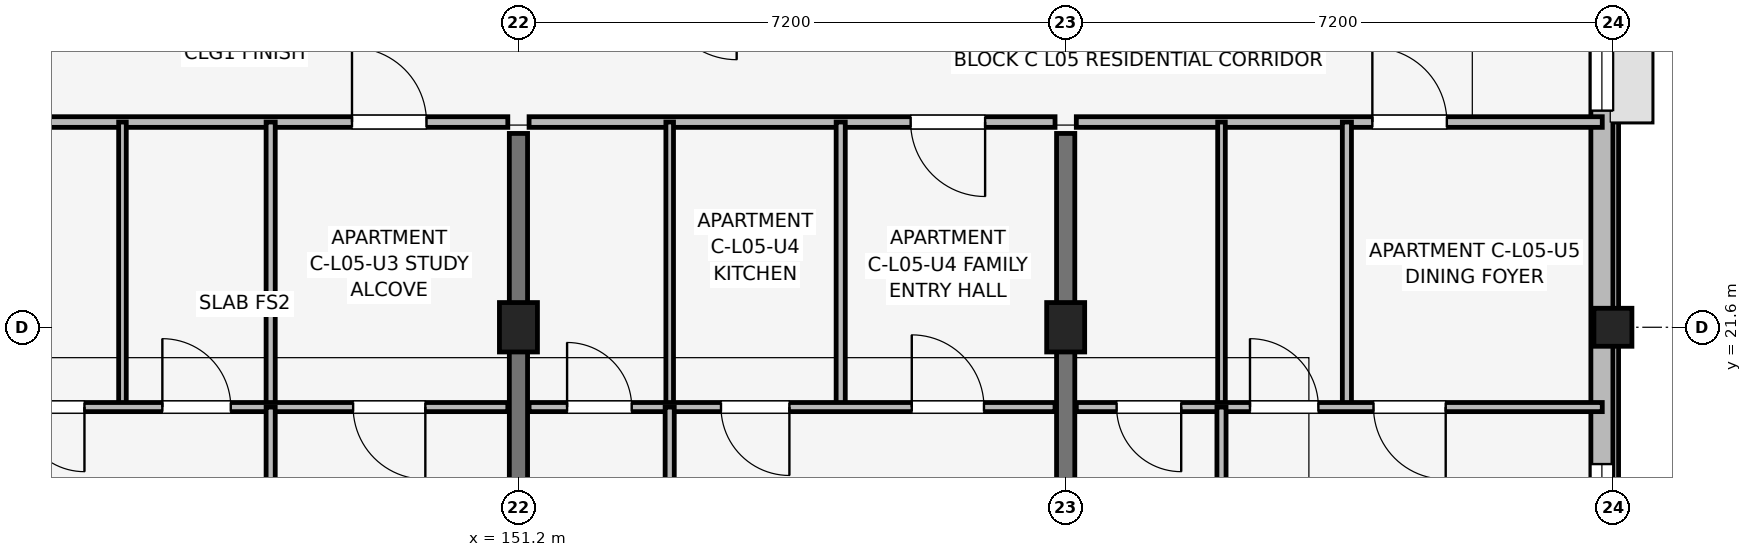
"""IFC4 building model, lengths in metres.
Left out: names, types, materials, properties, quantities, classifications, styles, units other than length and angle.
Written with IfcOpenShell. Run it as: python <this file> out.ifc"""

import sys

from ifc_helpers import new_model, si_unit, direction, frame, frame_2d, origin, origin_2d, place, context, subcontext, project, spatial, rectangle, extrude, element, fill, save


model = new_model("IFC4")
c1 = context("Model", 3, precision=1e-05, world=origin(), true_north=direction((0.0, 1.0)))
c2 = subcontext(c1, "Body", "Model", "MODEL_VIEW")
j1 = project(units=[si_unit("LENGTHUNIT", "METRE"), si_unit("PLANEANGLEUNIT", "RADIAN")], contexts=[c1])
p1 = place(None, origin())
s1 = spatial("IfcSite", under=j1, at=p1, CompositionType="ELEMENT")
p2 = place(p1, origin())
s2 = spatial("IfcBuilding", under=s1, at=p2, CompositionType="ELEMENT")
p3 = place(p2, frame((0.0, 0.0, 18.15)))
s3 = spatial("IfcBuildingStorey", under=s2, at=p3, CompositionType="ELEMENT", Elevation=18.15)
for number, where, z_axis, x_axis in (
    (1, (151.2, 21.6, 0.0), (0.0, 0.0, 1.0), (1.0, 0.0, 0.0)),
    (2, (158.4, 21.6, 0.0), (0.0, 0.0, 1.0), (1.0, 0.0, 0.0)),
):
    element("IfcColumn", number, at=place(p3, frame(where, z_axis=z_axis, x_axis=x_axis)), inside=s3, PredefinedType="COLUMN", context=c2, shape_type="SweptSolid", body=[
        extrude(rectangle(XDim=0.5, YDim=0.65, at=origin_2d()), origin(), (0.0, 0.0, 1.0), 3.15),
    ])
p4 = place(p3, frame((165.6, 21.6, 0.0), z_axis=(0.0, 0.0, 1.0), x_axis=(1.0, 0.0, 0.0)))
e3 = element("IfcColumn", 3, at=p4, inside=s3, PredefinedType="COLUMN", context=c2, shape_type="SweptSolid", body=[
    extrude(rectangle(XDim=0.5, YDim=0.5, at=origin_2d()), origin(), (0.0, 0.0, 1.0), 3.15),
])
for number, where, z_axis, x_axis in (
    (4, (151.2, 14.75, 0.0), (0.0, 0.0, 1.0), (0.0, 1.0, 0.0)),
    (5, (158.4, 14.75, 0.0), (0.0, 0.0, 1.0), (0.0, 1.0, 0.0)),
):
    element("IfcWall", number, at=place(p3, frame(where, z_axis=z_axis, x_axis=x_axis)), inside=s3, PredefinedType="SHEAR", context=c2, shape_type="SweptSolid", body=[
        extrude(rectangle(XDim=9.4, YDim=0.24, at=frame_2d((4.7, 0.0))), origin(), (0.0, 0.0, 1.0), 3.15),
    ])
p5 = place(p3, frame((165.455, 17.4, 0.0), z_axis=(0.0, 0.0, 1.0), x_axis=(0.0, 1.0, 0.0)))
e6 = element("IfcWall", 6, at=p5, inside=s3, PredefinedType="SOLIDWALL", context=c2, shape_type="SweptSolid", body=[
    extrude(rectangle(XDim=15.6, YDim=0.29, at=frame_2d((7.8, 0.0))), origin(), (0.0, 0.0, 1.0), 2.38),
])
p6 = place(p5, frame((7.05, 0.0, 1.05)))
e7 = element("IfcOpeningElement", 7, at=p6, cuts=e6, PredefinedType="OPENING", context=c2, shape_type="SweptSolid", body=[
    extrude(rectangle(XDim=1.5, YDim=1.15, at=frame_2d((0.75, 0.575))), frame((0.0, 0.155, 0.0), z_axis=(0.0, -1.0, 0.0), x_axis=(1.0, 0.0, 0.0)), (0.0, 0.0, 1.0), 0.31),
])
p7 = place(p5, frame((0.98, 0.0, 0.67)))
e8 = element("IfcOpeningElement", 8, at=p7, cuts=e6, PredefinedType="OPENING", context=c2, shape_type="SweptSolid", body=[
    extrude(rectangle(XDim=1.42, YDim=1.6, at=frame_2d((0.71, 0.8))), frame((0.0, 0.155, 0.0), z_axis=(0.0, -1.0, 0.0), x_axis=(1.0, 0.0, 0.0)), (0.0, 0.0, 1.0), 0.31),
])
p8 = place(p3, frame((144.14, 24.3, 0.0), z_axis=(0.0, 0.0, 1.0), x_axis=(1.0, 0.0, 0.0)))
e9 = element("IfcWall", 9, at=p8, inside=s3, PredefinedType="PARTITIONING", context=c2, shape_type="SweptSolid", body=[
    extrude(rectangle(XDim=6.92, YDim=0.14, at=frame_2d((3.46, 0.0))), origin(), (0.0, 0.0, 1.0), 2.38),
])
p9 = place(p8, frame((4.87, 0.0, 0.0)))
e10 = element("IfcOpeningElement", 10, at=p9, cuts=e9, PredefinedType="OPENING", context=c2, shape_type="SweptSolid", body=[
    extrude(rectangle(XDim=0.98, YDim=2.1, at=frame_2d((0.49, 1.05))), frame((0.0, 0.08, 0.0), z_axis=(0.0, -1.0, 0.0), x_axis=(1.0, 0.0, 0.0)), (0.0, 0.0, 1.0), 0.16),
])
p10 = place(p3, frame((145.99, 20.55, 0.0), z_axis=(0.0, 0.0, 1.0), x_axis=(0.0, 1.0, 0.0)))
e11 = element("IfcWall", 11, at=p10, inside=s3, PredefinedType="PARTITIONING", context=c2, shape_type="SweptSolid", body=[
    extrude(rectangle(XDim=3.75, YDim=0.1, at=frame_2d((1.875, 0.0))), origin(), (0.0, 0.0, 1.0), 2.375),
])
p11 = place(p3, frame((147.94, 20.55, 0.0), z_axis=(0.0, 0.0, 1.0), x_axis=(0.0, 1.0, 0.0)))
e12 = element("IfcWall", 12, at=p11, inside=s3, PredefinedType="PARTITIONING", context=c2, shape_type="SweptSolid", body=[
    extrude(rectangle(XDim=3.75, YDim=0.12, at=frame_2d((1.875, 0.0))), origin(), (0.0, 0.0, 1.0), 2.375),
])
p12 = place(p3, frame((144.14, 20.55, 0.0), z_axis=(0.0, 0.0, 1.0), x_axis=(1.0, 0.0, 0.0)))
e13 = element("IfcWall", 13, at=p12, inside=s3, PredefinedType="PARTITIONING", context=c2, shape_type="SweptSolid", body=[
    extrude(rectangle(XDim=6.92, YDim=0.12, at=frame_2d((3.46, 0.0))), origin(), (0.0, 0.0, 1.0), 2.38),
])
p13 = place(p12, frame((1.35, 0.0, 0.0), z_axis=(0.0, 0.0, 1.0), x_axis=(-1.0, 0.0, 0.0)))
e14 = element("IfcOpeningElement", 14, at=p13, cuts=e13, PredefinedType="OPENING", context=c2, shape_type="SweptSolid", body=[
    extrude(rectangle(XDim=0.85, YDim=2.08, at=frame_2d((0.425, 1.04))), frame((0.0, 0.07, 0.0), z_axis=(0.0, -1.0, 0.0), x_axis=(1.0, 0.0, 0.0)), (0.0, 0.0, 1.0), 0.14),
])
p14 = place(p12, frame((2.375, 0.0, 0.0)))
e15 = element("IfcOpeningElement", 15, at=p14, cuts=e13, PredefinedType="OPENING", context=c2, shape_type="SweptSolid", body=[
    extrude(rectangle(XDim=0.9, YDim=2.08, at=frame_2d((0.45, 1.04))), frame((0.0, 0.07, 0.0), z_axis=(0.0, -1.0, 0.0), x_axis=(1.0, 0.0, 0.0)), (0.0, 0.0, 1.0), 0.14),
])
p15 = place(p12, frame((5.835, 0.0, 0.0), z_axis=(0.0, 0.0, 1.0), x_axis=(-1.0, 0.0, 0.0)))
e16 = element("IfcOpeningElement", 16, at=p15, cuts=e13, PredefinedType="OPENING", context=c2, shape_type="SweptSolid", body=[
    extrude(rectangle(XDim=0.95, YDim=2.08, at=frame_2d((0.475, 1.04))), frame((0.0, 0.07, 0.0), z_axis=(0.0, -1.0, 0.0), x_axis=(1.0, 0.0, 0.0)), (0.0, 0.0, 1.0), 0.14),
])
p16 = place(p3, frame((147.94, 14.7, 0.0), z_axis=(0.0, 0.0, 1.0), x_axis=(0.0, 1.0, 0.0)))
e17 = element("IfcWall", 17, at=p16, inside=s3, PredefinedType="PARTITIONING", context=c2, shape_type="SweptSolid", body=[
    extrude(rectangle(XDim=5.85, YDim=0.12, at=frame_2d((2.925, 0.0))), origin(), (0.0, 0.0, 1.0), 2.38),
])
p17 = place(p16, frame((2.475, 0.0, 0.0)))
e18 = element("IfcOpeningElement", 18, at=p17, cuts=e17, PredefinedType="OPENING", context=c2, shape_type="SweptSolid", body=[
    extrude(rectangle(XDim=0.9, YDim=2.08, at=frame_2d((0.45, 1.04))), frame((0.0, 0.07, 0.0), z_axis=(0.0, -1.0, 0.0), x_axis=(1.0, 0.0, 0.0)), (0.0, 0.0, 1.0), 0.14),
])
p18 = place(p3, frame((151.34, 24.3, 0.0), z_axis=(0.0, 0.0, 1.0), x_axis=(1.0, 0.0, 0.0)))
e19 = element("IfcWall", 19, at=p18, inside=s3, PredefinedType="PARTITIONING", context=c2, shape_type="SweptSolid", body=[
    extrude(rectangle(XDim=6.92, YDim=0.14, at=frame_2d((3.46, 0.0))), origin(), (0.0, 0.0, 1.0), 2.38),
])
p19 = place(p18, frame((6.0, 0.0, 0.0), z_axis=(0.0, 0.0, 1.0), x_axis=(-1.0, 0.0, 0.0)))
e20 = element("IfcOpeningElement", 20, at=p19, cuts=e19, PredefinedType="OPENING", context=c2, shape_type="SweptSolid", body=[
    extrude(rectangle(XDim=0.98, YDim=2.1, at=frame_2d((0.49, 1.05))), frame((0.0, 0.08, 0.0), z_axis=(0.0, -1.0, 0.0), x_axis=(1.0, 0.0, 0.0)), (0.0, 0.0, 1.0), 0.16),
])
p20 = place(p3, frame((153.19, 20.55, 0.0), z_axis=(0.0, 0.0, 1.0), x_axis=(0.0, 1.0, 0.0)))
e21 = element("IfcWall", 21, at=p20, inside=s3, PredefinedType="PARTITIONING", context=c2, shape_type="SweptSolid", body=[
    extrude(rectangle(XDim=3.75, YDim=0.1, at=frame_2d((1.875, 0.0))), origin(), (0.0, 0.0, 1.0), 2.375),
])
p21 = place(p3, frame((155.44, 20.55, 0.0), z_axis=(0.0, 0.0, 1.0), x_axis=(0.0, 1.0, 0.0)))
e22 = element("IfcWall", 22, at=p21, inside=s3, PredefinedType="PARTITIONING", context=c2, shape_type="SweptSolid", body=[
    extrude(rectangle(XDim=3.75, YDim=0.12, at=frame_2d((1.875, 0.0))), origin(), (0.0, 0.0, 1.0), 2.375),
])
p22 = place(p3, frame((151.34, 20.55, 0.0), z_axis=(0.0, 0.0, 1.0), x_axis=(1.0, 0.0, 0.0)))
e23 = element("IfcWall", 23, at=p22, inside=s3, PredefinedType="PARTITIONING", context=c2, shape_type="SweptSolid", body=[
    extrude(rectangle(XDim=6.92, YDim=0.12, at=frame_2d((3.46, 0.0))), origin(), (0.0, 0.0, 1.0), 2.38),
])
p23 = place(p22, frame((0.5, 0.0, 0.0)))
e24 = element("IfcOpeningElement", 24, at=p23, cuts=e23, PredefinedType="OPENING", context=c2, shape_type="SweptSolid", body=[
    extrude(rectangle(XDim=0.85, YDim=2.08, at=frame_2d((0.425, 1.04))), frame((0.0, 0.07, 0.0), z_axis=(0.0, -1.0, 0.0), x_axis=(1.0, 0.0, 0.0)), (0.0, 0.0, 1.0), 0.14),
])
p24 = place(p22, frame((3.425, 0.0, 0.0), z_axis=(0.0, 0.0, 1.0), x_axis=(-1.0, 0.0, 0.0)))
e25 = element("IfcOpeningElement", 25, at=p24, cuts=e23, PredefinedType="OPENING", context=c2, shape_type="SweptSolid", body=[
    extrude(rectangle(XDim=0.9, YDim=2.08, at=frame_2d((0.45, 1.04))), frame((0.0, 0.07, 0.0), z_axis=(0.0, -1.0, 0.0), x_axis=(1.0, 0.0, 0.0)), (0.0, 0.0, 1.0), 0.14),
])
p25 = place(p22, frame((5.035, 0.0, 0.0)))
e26 = element("IfcOpeningElement", 26, at=p25, cuts=e23, PredefinedType="OPENING", context=c2, shape_type="SweptSolid", body=[
    extrude(rectangle(XDim=0.95, YDim=2.08, at=frame_2d((0.475, 1.04))), frame((0.0, 0.07, 0.0), z_axis=(0.0, -1.0, 0.0), x_axis=(1.0, 0.0, 0.0)), (0.0, 0.0, 1.0), 0.14),
])
p26 = place(p3, frame((153.19, 14.7, 0.0), z_axis=(0.0, 0.0, 1.0), x_axis=(0.0, 1.0, 0.0)))
e27 = element("IfcWall", 27, at=p26, inside=s3, PredefinedType="PARTITIONING", context=c2, shape_type="SweptSolid", body=[
    extrude(rectangle(XDim=5.85, YDim=0.12, at=frame_2d((2.925, 0.0))), origin(), (0.0, 0.0, 1.0), 2.38),
])
p27 = place(p26, frame((3.375, 0.0, 0.0), z_axis=(0.0, 0.0, 1.0), x_axis=(-1.0, 0.0, 0.0)))
e28 = element("IfcOpeningElement", 28, at=p27, cuts=e27, PredefinedType="OPENING", context=c2, shape_type="SweptSolid", body=[
    extrude(rectangle(XDim=0.9, YDim=2.08, at=frame_2d((0.45, 1.04))), frame((0.0, 0.07, 0.0), z_axis=(0.0, -1.0, 0.0), x_axis=(1.0, 0.0, 0.0)), (0.0, 0.0, 1.0), 0.14),
])
p28 = place(p3, frame((158.54, 24.3, 0.0), z_axis=(0.0, 0.0, 1.0), x_axis=(1.0, 0.0, 0.0)))
e29 = element("IfcWall", 29, at=p28, inside=s3, PredefinedType="PARTITIONING", context=c2, shape_type="SweptSolid", body=[
    extrude(rectangle(XDim=6.92, YDim=0.14, at=frame_2d((3.46, 0.0))), origin(), (0.0, 0.0, 1.0), 2.38),
])
p29 = place(p28, frame((3.895, 0.0, 0.0)))
e30 = element("IfcOpeningElement", 30, at=p29, cuts=e29, PredefinedType="OPENING", context=c2, shape_type="SweptSolid", body=[
    extrude(rectangle(XDim=0.98, YDim=2.1, at=frame_2d((0.49, 1.05))), frame((0.0, 0.08, 0.0), z_axis=(0.0, -1.0, 0.0), x_axis=(1.0, 0.0, 0.0)), (0.0, 0.0, 1.0), 0.16),
])
p30 = place(p3, frame((160.45, 20.55, 0.0), z_axis=(0.0, 0.0, 1.0), x_axis=(0.0, 1.0, 0.0)))
e31 = element("IfcWall", 31, at=p30, inside=s3, PredefinedType="PARTITIONING", context=c2, shape_type="SweptSolid", body=[
    extrude(rectangle(XDim=3.75, YDim=0.1, at=frame_2d((1.875, 0.0))), origin(), (0.0, 0.0, 1.0), 2.375),
])
p31 = place(p3, frame((162.1, 20.55, 0.0), z_axis=(0.0, 0.0, 1.0), x_axis=(0.0, 1.0, 0.0)))
e32 = element("IfcWall", 32, at=p31, inside=s3, PredefinedType="PARTITIONING", context=c2, shape_type="SweptSolid", body=[
    extrude(rectangle(XDim=3.75, YDim=0.12, at=frame_2d((1.875, 0.0))), origin(), (0.0, 0.0, 1.0), 2.375),
])
p32 = place(p3, frame((158.54, 20.55, 0.0), z_axis=(0.0, 0.0, 1.0), x_axis=(1.0, 0.0, 0.0)))
e33 = element("IfcWall", 33, at=p32, inside=s3, PredefinedType="PARTITIONING", context=c2, shape_type="SweptSolid", body=[
    extrude(rectangle(XDim=6.92, YDim=0.12, at=frame_2d((3.46, 0.0))), origin(), (0.0, 0.0, 1.0), 2.38),
])
p33 = place(p32, frame((1.38, 0.0, 0.0), z_axis=(0.0, 0.0, 1.0), x_axis=(-1.0, 0.0, 0.0)))
e34 = element("IfcOpeningElement", 34, at=p33, cuts=e33, PredefinedType="OPENING", context=c2, shape_type="SweptSolid", body=[
    extrude(rectangle(XDim=0.85, YDim=2.08, at=frame_2d((0.425, 1.04))), frame((0.0, 0.07, 0.0), z_axis=(0.0, -1.0, 0.0), x_axis=(1.0, 0.0, 0.0)), (0.0, 0.0, 1.0), 0.14),
])
p34 = place(p32, frame((2.285, 0.0, 0.0)))
e35 = element("IfcOpeningElement", 35, at=p34, cuts=e33, PredefinedType="OPENING", context=c2, shape_type="SweptSolid", body=[
    extrude(rectangle(XDim=0.9, YDim=2.08, at=frame_2d((0.45, 1.04))), frame((0.0, 0.07, 0.0), z_axis=(0.0, -1.0, 0.0), x_axis=(1.0, 0.0, 0.0)), (0.0, 0.0, 1.0), 0.14),
])
p35 = place(p32, frame((4.86, 0.0, 0.0), z_axis=(0.0, 0.0, 1.0), x_axis=(-1.0, 0.0, 0.0)))
e36 = element("IfcOpeningElement", 36, at=p35, cuts=e33, PredefinedType="OPENING", context=c2, shape_type="SweptSolid", body=[
    extrude(rectangle(XDim=0.95, YDim=2.08, at=frame_2d((0.475, 1.04))), frame((0.0, 0.07, 0.0), z_axis=(0.0, -1.0, 0.0), x_axis=(1.0, 0.0, 0.0)), (0.0, 0.0, 1.0), 0.14),
])
p36 = place(p3, frame((160.45, 14.7, 0.0), z_axis=(0.0, 0.0, 1.0), x_axis=(0.0, 1.0, 0.0)))
e37 = element("IfcWall", 37, at=p36, inside=s3, PredefinedType="PARTITIONING", context=c2, shape_type="SweptSolid", body=[
    extrude(rectangle(XDim=5.85, YDim=0.12, at=frame_2d((2.925, 0.0))), origin(), (0.0, 0.0, 1.0), 2.38),
])
p37 = place(p36, frame((2.475, 0.0, 0.0)))
e38 = element("IfcOpeningElement", 38, at=p37, cuts=e37, PredefinedType="OPENING", context=c2, shape_type="SweptSolid", body=[
    extrude(rectangle(XDim=0.9, YDim=2.08, at=frame_2d((0.45, 1.04))), frame((0.0, 0.07, 0.0), z_axis=(0.0, -1.0, 0.0), x_axis=(1.0, 0.0, 0.0)), (0.0, 0.0, 1.0), 0.14),
])
p38 = place(p6, origin())
e39 = element("IfcWindow", 39, at=p38, inside=s3, PartitioningType="SINGLE_PANEL", PredefinedType="WINDOW", context=c2, shape_type="SweptSolid", body=[
    extrude(rectangle(XDim=1.5, YDim=1.15, at=frame_2d((0.75, 0.575))), frame((0.0, 0.03, 0.0), z_axis=(0.0, -1.0, 0.0), x_axis=(1.0, 0.0, 0.0)), (0.0, 0.0, 1.0), 0.06),
])
fill(e7, e39)
p39 = place(p7, origin())
e40 = element("IfcWindow", 40, at=p39, inside=s3, PartitioningType="SINGLE_PANEL", PredefinedType="WINDOW", context=c2, shape_type="SweptSolid", body=[
    extrude(rectangle(XDim=1.42, YDim=1.6, at=frame_2d((0.71, 0.8))), frame((0.0, 0.03, 0.0), z_axis=(0.0, -1.0, 0.0), x_axis=(1.0, 0.0, 0.0)), (0.0, 0.0, 1.0), 0.06),
])
fill(e8, e40)
p40 = place(p9, origin())
e41 = element("IfcDoor", 41, at=p40, inside=s3, OperationType="SINGLE_SWING_LEFT", PredefinedType="DOOR", context=c2, shape_type="SweptSolid", body=[
    extrude(rectangle(XDim=0.98, YDim=2.1, at=frame_2d((0.49, 1.05))), frame((0.0, 0.025, 0.0), z_axis=(0.0, -1.0, 0.0), x_axis=(1.0, 0.0, 0.0)), (0.0, 0.0, 1.0), 0.05),
])
fill(e10, e41)
p41 = place(p13, origin())
e42 = element("IfcDoor", 42, at=p41, inside=s3, OperationType="SINGLE_SWING_RIGHT", PredefinedType="DOOR", context=c2, shape_type="SweptSolid", body=[
    extrude(rectangle(XDim=0.85, YDim=2.08, at=frame_2d((0.425, 1.04))), frame((0.0, 0.025, 0.0), z_axis=(0.0, -1.0, 0.0), x_axis=(1.0, 0.0, 0.0)), (0.0, 0.0, 1.0), 0.05),
])
fill(e14, e42)
p42 = place(p14, origin())
e43 = element("IfcDoor", 43, at=p42, inside=s3, OperationType="SINGLE_SWING_LEFT", PredefinedType="DOOR", context=c2, shape_type="SweptSolid", body=[
    extrude(rectangle(XDim=0.9, YDim=2.08, at=frame_2d((0.45, 1.04))), frame((0.0, 0.025, 0.0), z_axis=(0.0, -1.0, 0.0), x_axis=(1.0, 0.0, 0.0)), (0.0, 0.0, 1.0), 0.05),
])
fill(e15, e43)
p43 = place(p15, origin())
e44 = element("IfcDoor", 44, at=p43, inside=s3, OperationType="SINGLE_SWING_RIGHT", PredefinedType="DOOR", context=c2, shape_type="SweptSolid", body=[
    extrude(rectangle(XDim=0.95, YDim=2.08, at=frame_2d((0.475, 1.04))), frame((0.0, 0.025, 0.0), z_axis=(0.0, -1.0, 0.0), x_axis=(1.0, 0.0, 0.0)), (0.0, 0.0, 1.0), 0.05),
])
fill(e16, e44)
p44 = place(p19, origin())
e45 = element("IfcDoor", 45, at=p44, inside=s3, OperationType="SINGLE_SWING_RIGHT", PredefinedType="DOOR", context=c2, shape_type="SweptSolid", body=[
    extrude(rectangle(XDim=0.98, YDim=2.1, at=frame_2d((0.49, 1.05))), frame((0.0, 0.025, 0.0), z_axis=(0.0, -1.0, 0.0), x_axis=(1.0, 0.0, 0.0)), (0.0, 0.0, 1.0), 0.05),
])
fill(e20, e45)
p45 = place(p23, origin())
e46 = element("IfcDoor", 46, at=p45, inside=s3, OperationType="SINGLE_SWING_LEFT", PredefinedType="DOOR", context=c2, shape_type="SweptSolid", body=[
    extrude(rectangle(XDim=0.85, YDim=2.08, at=frame_2d((0.425, 1.04))), frame((0.0, 0.025, 0.0), z_axis=(0.0, -1.0, 0.0), x_axis=(1.0, 0.0, 0.0)), (0.0, 0.0, 1.0), 0.05),
])
fill(e24, e46)
p46 = place(p24, origin())
e47 = element("IfcDoor", 47, at=p46, inside=s3, OperationType="SINGLE_SWING_RIGHT", PredefinedType="DOOR", context=c2, shape_type="SweptSolid", body=[
    extrude(rectangle(XDim=0.9, YDim=2.08, at=frame_2d((0.45, 1.04))), frame((0.0, 0.025, 0.0), z_axis=(0.0, -1.0, 0.0), x_axis=(1.0, 0.0, 0.0)), (0.0, 0.0, 1.0), 0.05),
])
fill(e25, e47)
p47 = place(p25, origin())
e48 = element("IfcDoor", 48, at=p47, inside=s3, OperationType="SINGLE_SWING_LEFT", PredefinedType="DOOR", context=c2, shape_type="SweptSolid", body=[
    extrude(rectangle(XDim=0.95, YDim=2.08, at=frame_2d((0.475, 1.04))), frame((0.0, 0.025, 0.0), z_axis=(0.0, -1.0, 0.0), x_axis=(1.0, 0.0, 0.0)), (0.0, 0.0, 1.0), 0.05),
])
fill(e26, e48)
p48 = place(p29, origin())
e49 = element("IfcDoor", 49, at=p48, inside=s3, OperationType="SINGLE_SWING_LEFT", PredefinedType="DOOR", context=c2, shape_type="SweptSolid", body=[
    extrude(rectangle(XDim=0.98, YDim=2.1, at=frame_2d((0.49, 1.05))), frame((0.0, 0.025, 0.0), z_axis=(0.0, -1.0, 0.0), x_axis=(1.0, 0.0, 0.0)), (0.0, 0.0, 1.0), 0.05),
])
fill(e30, e49)
p49 = place(p33, origin())
e50 = element("IfcDoor", 50, at=p49, inside=s3, OperationType="SINGLE_SWING_RIGHT", PredefinedType="DOOR", context=c2, shape_type="SweptSolid", body=[
    extrude(rectangle(XDim=0.85, YDim=2.08, at=frame_2d((0.425, 1.04))), frame((0.0, 0.025, 0.0), z_axis=(0.0, -1.0, 0.0), x_axis=(1.0, 0.0, 0.0)), (0.0, 0.0, 1.0), 0.05),
])
fill(e34, e50)
p50 = place(p34, origin())
e51 = element("IfcDoor", 51, at=p50, inside=s3, OperationType="SINGLE_SWING_LEFT", PredefinedType="DOOR", context=c2, shape_type="SweptSolid", body=[
    extrude(rectangle(XDim=0.9, YDim=2.08, at=frame_2d((0.45, 1.04))), frame((0.0, 0.025, 0.0), z_axis=(0.0, -1.0, 0.0), x_axis=(1.0, 0.0, 0.0)), (0.0, 0.0, 1.0), 0.05),
])
fill(e35, e51)
p51 = place(p35, origin())
e52 = element("IfcDoor", 52, at=p51, inside=s3, OperationType="SINGLE_SWING_RIGHT", PredefinedType="DOOR", context=c2, shape_type="SweptSolid", body=[
    extrude(rectangle(XDim=0.95, YDim=2.08, at=frame_2d((0.475, 1.04))), frame((0.0, 0.025, 0.0), z_axis=(0.0, -1.0, 0.0), x_axis=(1.0, 0.0, 0.0)), (0.0, 0.0, 1.0), 0.05),
])
fill(e36, e52)
save(model, sys.argv[1])
